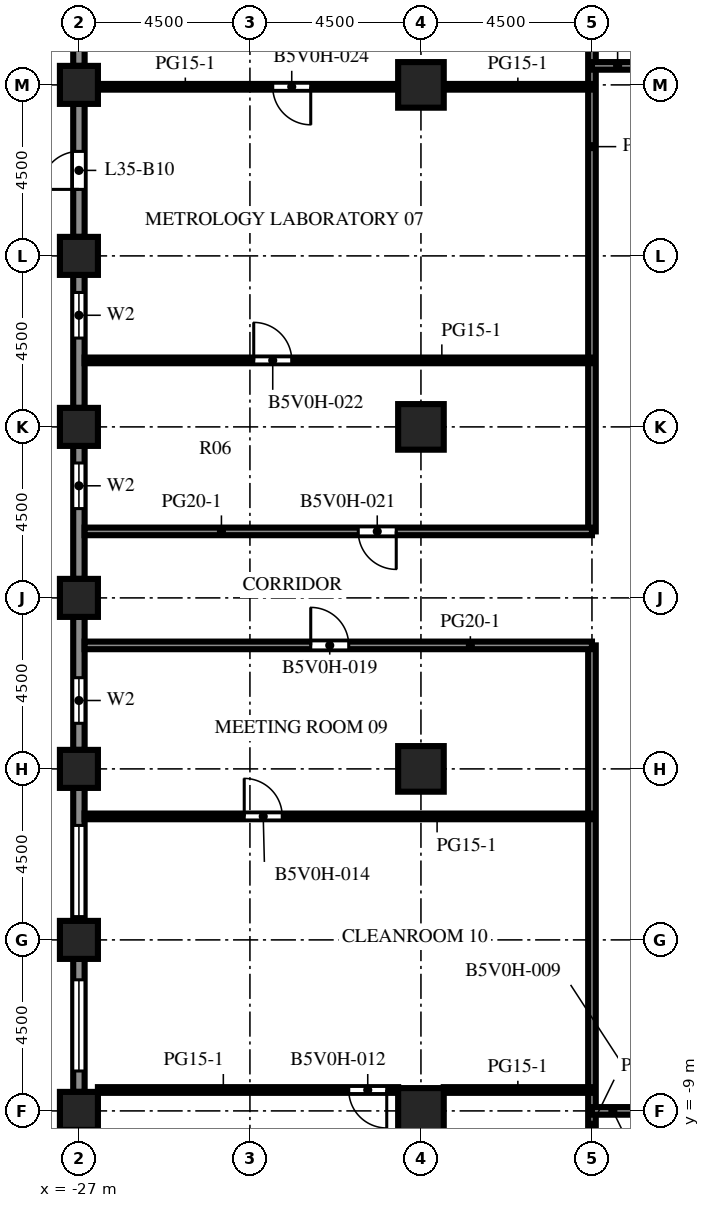
"""IFC4 building model, lengths in metres.
Left out: names, types, materials, properties, quantities, classifications, styles, units other than length and angle.
Written with IfcOpenShell. Run it as: python <this file> out.ifc"""

import sys

from ifc_helpers import new_model, si_unit, direction, frame, frame_2d, origin, origin_2d, place, context, subcontext, project, spatial, rectangle, extrude, element, fill, save


model = new_model("IFC4")
c1 = context("Model", 3, precision=1e-05, world=origin(), true_north=direction((0.0, 1.0)))
c2 = subcontext(c1, "Body", "Model", "MODEL_VIEW")
j1 = project(units=[si_unit("LENGTHUNIT", "METRE"), si_unit("PLANEANGLEUNIT", "RADIAN")], contexts=[c1])
p1 = place(None, origin())
s1 = spatial("IfcSite", under=j1, at=p1, CompositionType="ELEMENT")
p2 = place(p1, origin())
s2 = spatial("IfcBuilding", under=s1, at=p2, CompositionType="ELEMENT")
p3 = place(p2, frame((0.0, 0.0, 156.8)))
s3 = spatial("IfcBuildingStorey", under=s2, at=p3, CompositionType="ELEMENT", Elevation=156.8)
for number, where, z_axis, x_axis in (
    (1, (-27.0, -9.0, 0.0), (0.0, 0.0, 1.0), (1.0, 0.0, 0.0)),
    (2, (-27.0, -4.5, 0.0), (0.0, 0.0, 1.0), (1.0, 0.0, 0.0)),
    (3, (-27.0, 0.0, 0.0), (0.0, 0.0, 1.0), (1.0, 0.0, 0.0)),
    (4, (-27.0, 4.5, 0.0), (0.0, 0.0, 1.0), (1.0, 0.0, 0.0)),
    (5, (-27.0, 9.0, 0.0), (0.0, 0.0, 1.0), (1.0, 0.0, 0.0)),
    (6, (-27.0, 13.5, 0.0), (0.0, 0.0, 1.0), (1.0, 0.0, 0.0)),
    (7, (-27.0, 18.0, 0.0), (0.0, 0.0, 1.0), (1.0, 0.0, 0.0)),
):
    element("IfcColumn", number, at=place(p3, frame(where, z_axis=z_axis, x_axis=x_axis)), inside=s3, PredefinedType="COLUMN", context=c2, shape_type="SweptSolid", body=[
        extrude(rectangle(XDim=1.0, YDim=1.0, at=origin_2d()), origin(), (0.0, 0.0, 1.0), 4.1),
    ])
p4 = place(p3, frame((-18.0, -9.0, -0.45), z_axis=(0.0, 0.0, 1.0), x_axis=(1.0, 0.0, 0.0)))
e8 = element("IfcColumn", 8, at=p4, inside=s3, PredefinedType="COLUMN", context=c2, shape_type="SweptSolid", body=[
    extrude(rectangle(XDim=1.2, YDim=1.2, at=origin_2d()), origin(), (0.0, 0.0, 1.0), 4.55),
])
for number, where, z_axis, x_axis in (
    (9, (-18.0, 0.0, 0.0), (0.0, 0.0, 1.0), (1.0, 0.0, 0.0)),
    (10, (-18.0, 9.0, 0.0), (0.0, 0.0, 1.0), (1.0, 0.0, 0.0)),
    (11, (-18.0, 18.0, 0.0), (0.0, 0.0, 1.0), (1.0, 0.0, 0.0)),
):
    element("IfcColumn", number, at=place(p3, frame(where, z_axis=z_axis, x_axis=x_axis)), inside=s3, PredefinedType="COLUMN", context=c2, shape_type="SweptSolid", body=[
        extrude(rectangle(XDim=1.2, YDim=1.2, at=origin_2d()), origin(), (0.0, 0.0, 1.0), 4.1),
    ])
p5 = place(p3, frame((-27.0, 18.5, 0.0), z_axis=(0.0, 0.0, 1.0), x_axis=(0.0, 1.0, 0.0)))
e12 = element("IfcWall", 12, at=p5, inside=s3, PredefinedType="SOLIDWALL", context=c2, shape_type="SweptSolid", body=[
    extrude(rectangle(XDim=3.5, YDim=0.3, at=frame_2d((1.75, 0.0))), origin(), (0.0, 0.0, 1.0), 2.85),
])
p6 = place(p5, frame((0.55, 0.0, 0.8)))
e13 = element("IfcOpeningElement", 13, at=p6, cuts=e12, PredefinedType="OPENING", context=c2, shape_type="SweptSolid", body=[
    extrude(rectangle(XDim=2.4, YDim=1.7, at=frame_2d((1.2, 0.85))), frame((0.0, 0.16, 0.0), z_axis=(0.0, -1.0, 0.0), x_axis=(1.0, 0.0, 0.0)), (0.0, 0.0, 1.0), 0.32),
])
p7 = place(p3, frame((-27.0, 14.0, 0.0), z_axis=(0.0, 0.0, 1.0), x_axis=(0.0, 1.0, 0.0)))
e14 = element("IfcWall", 14, at=p7, inside=s3, PredefinedType="SOLIDWALL", context=c2, shape_type="SweptSolid", body=[
    extrude(rectangle(XDim=3.5, YDim=0.3, at=frame_2d((1.75, 0.0))), origin(), (0.0, 0.0, 1.0), 2.85),
])
p8 = place(p7, frame((1.25, 0.0, 0.0)))
e15 = element("IfcOpeningElement", 15, at=p8, cuts=e14, PredefinedType="OPENING", context=c2, shape_type="SweptSolid", body=[
    extrude(rectangle(XDim=1.0, YDim=2.2, at=frame_2d((0.5, 1.1))), frame((0.0, 0.16, 0.0), z_axis=(0.0, -1.0, 0.0), x_axis=(1.0, 0.0, 0.0)), (0.0, 0.0, 1.0), 0.32),
])
p9 = place(p3, frame((-27.0, 9.5, 0.0), z_axis=(0.0, 0.0, 1.0), x_axis=(0.0, 1.0, 0.0)))
e16 = element("IfcWall", 16, at=p9, inside=s3, PredefinedType="SOLIDWALL", context=c2, shape_type="SweptSolid", body=[
    extrude(rectangle(XDim=3.5, YDim=0.3, at=frame_2d((1.75, 0.0))), origin(), (0.0, 0.0, 1.0), 2.85),
])
p10 = place(p9, frame((1.837, 0.0, 0.8)))
e17 = element("IfcOpeningElement", 17, at=p10, cuts=e16, PredefinedType="OPENING", context=c2, shape_type="SweptSolid", body=[
    extrude(rectangle(XDim=1.2, YDim=1.7, at=frame_2d((0.6, 0.85))), frame((0.0, 0.16, 0.0), z_axis=(0.0, -1.0, 0.0), x_axis=(1.0, 0.0, 0.0)), (0.0, 0.0, 1.0), 0.32),
])
p11 = place(p3, frame((-27.0, 5.0, 0.0), z_axis=(0.0, 0.0, 1.0), x_axis=(0.0, 1.0, 0.0)))
e18 = element("IfcWall", 18, at=p11, inside=s3, PredefinedType="SOLIDWALL", context=c2, shape_type="SweptSolid", body=[
    extrude(rectangle(XDim=3.5, YDim=0.3, at=frame_2d((1.75, 0.0))), origin(), (0.0, 0.0, 1.0), 2.85),
])
p12 = place(p11, frame((1.85, 0.0, 0.8)))
e19 = element("IfcOpeningElement", 19, at=p12, cuts=e18, PredefinedType="OPENING", context=c2, shape_type="SweptSolid", body=[
    extrude(rectangle(XDim=1.2, YDim=1.7, at=frame_2d((0.6, 0.85))), frame((0.0, 0.16, 0.0), z_axis=(0.0, -1.0, 0.0), x_axis=(1.0, 0.0, 0.0)), (0.0, 0.0, 1.0), 0.32),
])
p13 = place(p3, frame((-27.0, 0.5, 0.0), z_axis=(0.0, 0.0, 1.0), x_axis=(0.0, 1.0, 0.0)))
e20 = element("IfcWall", 20, at=p13, inside=s3, PredefinedType="SOLIDWALL", context=c2, shape_type="SweptSolid", body=[
    extrude(rectangle(XDim=3.5, YDim=0.3, at=frame_2d((1.75, 0.0))), origin(), (0.0, 0.0, 1.0), 2.85),
])
p14 = place(p13, frame((0.7, 0.0, 0.8)))
e21 = element("IfcOpeningElement", 21, at=p14, cuts=e20, PredefinedType="OPENING", context=c2, shape_type="SweptSolid", body=[
    extrude(rectangle(XDim=1.2, YDim=1.7, at=frame_2d((0.6, 0.85))), frame((0.0, 0.16, 0.0), z_axis=(0.0, -1.0, 0.0), x_axis=(1.0, 0.0, 0.0)), (0.0, 0.0, 1.0), 0.32),
])
p15 = place(p3, frame((-27.0, -4.0, 0.0), z_axis=(0.0, 0.0, 1.0), x_axis=(0.0, 1.0, 0.0)))
e22 = element("IfcWall", 22, at=p15, inside=s3, PredefinedType="SOLIDWALL", context=c2, shape_type="SweptSolid", body=[
    extrude(rectangle(XDim=3.5, YDim=0.3, at=frame_2d((1.75, 0.0))), origin(), (0.0, 0.0, 1.0), 2.85),
])
p16 = place(p15, frame((0.113, 0.0, 0.8)))
e23 = element("IfcOpeningElement", 23, at=p16, cuts=e22, PredefinedType="OPENING", context=c2, shape_type="SweptSolid", body=[
    extrude(rectangle(XDim=2.4, YDim=1.7, at=frame_2d((1.2, 0.85))), frame((0.0, 0.16, 0.0), z_axis=(0.0, -1.0, 0.0), x_axis=(1.0, 0.0, 0.0)), (0.0, 0.0, 1.0), 0.32),
])
p17 = place(p3, frame((-27.0, -8.5, 0.0), z_axis=(0.0, 0.0, 1.0), x_axis=(0.0, 1.0, 0.0)))
e24 = element("IfcWall", 24, at=p17, inside=s3, PredefinedType="SOLIDWALL", context=c2, shape_type="SweptSolid", body=[
    extrude(rectangle(XDim=3.5, YDim=0.3, at=frame_2d((1.75, 0.0))), origin(), (0.0, 0.0, 1.0), 2.85),
])
p18 = place(p17, frame((0.55, 0.0, 0.8)))
e25 = element("IfcOpeningElement", 25, at=p18, cuts=e24, PredefinedType="OPENING", context=c2, shape_type="SweptSolid", body=[
    extrude(rectangle(XDim=2.4, YDim=1.7, at=frame_2d((1.2, 0.85))), frame((0.0, 0.16, 0.0), z_axis=(0.0, -1.0, 0.0), x_axis=(1.0, 0.0, 0.0)), (0.0, 0.0, 1.0), 0.32),
])
p19 = place(p3, frame((-13.5, -22.0, 0.0), z_axis=(0.0, 0.0, 1.0), x_axis=(0.0, 1.0, 0.0)))
e26 = element("IfcWall", 26, at=p19, inside=s3, PredefinedType="PARTITIONING", context=c2, shape_type="SweptSolid", body=[
    extrude(rectangle(XDim=25.25, YDim=0.2, at=frame_2d((12.625, 0.0))), origin(), (0.0, 0.0, 1.0), 3.65),
])
p20 = place(p3, frame((-13.5, 6.25, 0.0), z_axis=(0.0, 0.0, 1.0), x_axis=(0.0, 1.0, 0.0)))
e27 = element("IfcWall", 27, at=p20, inside=s3, PredefinedType="PARTITIONING", context=c2, shape_type="SweptSolid", body=[
    extrude(rectangle(XDim=20.25, YDim=0.2, at=frame_2d((10.125, 0.0))), origin(), (0.0, 0.0, 1.0), 3.65),
])
p21 = place(p3, frame((-10.5, -9.0, 0.0), z_axis=(0.0, 0.0, 1.0), x_axis=(-1.0, 0.0, 0.0)))
e28 = element("IfcWall", 28, at=p21, inside=s3, PredefinedType="PARTITIONING", context=c2, shape_type="SweptSolid", body=[
    extrude(rectangle(XDim=3.0, YDim=0.2, at=frame_2d((1.5, 0.0))), origin(), (0.0, 0.0, 1.0), 3.65),
])
p22 = place(p21, frame((0.9, 0.0, 0.0)))
e29 = element("IfcOpeningElement", 29, at=p22, cuts=e28, PredefinedType="OPENING", context=c2, shape_type="SweptSolid", body=[
    extrude(rectangle(XDim=1.0, YDim=2.1, at=frame_2d((0.5, 1.05))), frame((0.0, 0.11, 0.0), z_axis=(0.0, -1.0, 0.0), x_axis=(1.0, 0.0, 0.0)), (0.0, 0.0, 1.0), 0.22),
])
p23 = place(p3, frame((-18.6, -8.45, 0.0), z_axis=(0.0, 0.0, 1.0), x_axis=(-1.0, 0.0, 0.0)))
e30 = element("IfcWall", 30, at=p23, inside=s3, PredefinedType="PARTITIONING", context=c2, shape_type="SweptSolid", body=[
    extrude(rectangle(XDim=7.9, YDim=0.15, at=frame_2d((3.95, 0.0))), origin(), (0.0, 0.0, 1.0), 3.65),
])
p24 = place(p23, frame((0.3, 0.0, 0.0)))
e31 = element("IfcOpeningElement", 31, at=p24, cuts=e30, PredefinedType="OPENING", context=c2, shape_type="SweptSolid", body=[
    extrude(rectangle(XDim=1.0, YDim=2.1, at=frame_2d((0.5, 1.05))), frame((0.0, 0.085, 0.0), z_axis=(0.0, -1.0, 0.0), x_axis=(1.0, 0.0, 0.0)), (0.0, 0.0, 1.0), 0.17),
])
p25 = place(p3, frame((-17.4, -8.45, 0.0), z_axis=(0.0, 0.0, 1.0), x_axis=(1.0, 0.0, 0.0)))
e32 = element("IfcWall", 32, at=p25, inside=s3, PredefinedType="PARTITIONING", context=c2, shape_type="SweptSolid", body=[
    extrude(rectangle(XDim=3.9, YDim=0.15, at=frame_2d((1.95, 0.0))), origin(), (0.0, 0.0, 1.0), 3.65),
])
p26 = place(p3, frame((-13.5, -1.25, 0.0), z_axis=(0.0, 0.0, 1.0), x_axis=(-1.0, 0.0, 0.0)))
e33 = element("IfcWall", 33, at=p26, inside=s3, PredefinedType="PARTITIONING", context=c2, shape_type="SweptSolid", body=[
    extrude(rectangle(XDim=13.35, YDim=0.15, at=frame_2d((6.675, 0.0))), origin(), (0.0, 0.0, 1.0), 3.65),
])
p27 = place(p26, frame((8.15, 0.0, 0.0)))
e34 = element("IfcOpeningElement", 34, at=p27, cuts=e33, PredefinedType="OPENING", context=c2, shape_type="SweptSolid", body=[
    extrude(rectangle(XDim=1.0, YDim=2.1, at=frame_2d((0.5, 1.05))), frame((0.0, 0.085, 0.0), z_axis=(0.0, -1.0, 0.0), x_axis=(1.0, 0.0, 0.0)), (0.0, 0.0, 1.0), 0.17),
])
p28 = place(p3, frame((-13.5, 3.25, 0.0), z_axis=(0.0, 0.0, 1.0), x_axis=(-1.0, 0.0, 0.0)))
e35 = element("IfcWall", 35, at=p28, inside=s3, PredefinedType="PARTITIONING", context=c2, shape_type="SweptSolid", body=[
    extrude(rectangle(XDim=13.35, YDim=0.2, at=frame_2d((6.675, 0.0))), origin(), (0.0, 0.0, 1.0), 3.65),
])
p29 = place(p28, frame((6.4, 0.0, 0.0)))
e36 = element("IfcOpeningElement", 36, at=p29, cuts=e35, PredefinedType="OPENING", context=c2, shape_type="SweptSolid", body=[
    extrude(rectangle(XDim=1.0, YDim=2.1, at=frame_2d((0.5, 1.05))), frame((0.0, 0.11, 0.0), z_axis=(0.0, -1.0, 0.0), x_axis=(1.0, 0.0, 0.0)), (0.0, 0.0, 1.0), 0.22),
])
p30 = place(p3, frame((-26.85, 6.25, 0.0), z_axis=(0.0, 0.0, 1.0), x_axis=(1.0, 0.0, 0.0)))
e37 = element("IfcWall", 37, at=p30, inside=s3, PredefinedType="PARTITIONING", context=c2, shape_type="SweptSolid", body=[
    extrude(rectangle(XDim=13.35, YDim=0.2, at=frame_2d((6.675, 0.0))), origin(), (0.0, 0.0, 1.0), 3.65),
])
p31 = place(p30, frame((7.2, 0.0, 0.0)))
e38 = element("IfcOpeningElement", 38, at=p31, cuts=e37, PredefinedType="OPENING", context=c2, shape_type="SweptSolid", body=[
    extrude(rectangle(XDim=1.0, YDim=2.1, at=frame_2d((0.5, 1.05))), frame((0.0, 0.11, 0.0), z_axis=(0.0, -1.0, 0.0), x_axis=(1.0, 0.0, 0.0)), (0.0, 0.0, 1.0), 0.22),
])
p32 = place(p3, frame((-26.85, 10.75, 0.0), z_axis=(0.0, 0.0, 1.0), x_axis=(1.0, 0.0, 0.0)))
e39 = element("IfcWall", 39, at=p32, inside=s3, PredefinedType="PARTITIONING", context=c2, shape_type="SweptSolid", body=[
    extrude(rectangle(XDim=13.35, YDim=0.15, at=frame_2d((6.675, 0.0))), origin(), (0.0, 0.0, 1.0), 3.65),
])
p33 = place(p32, frame((4.45, 0.0, 0.0)))
e40 = element("IfcOpeningElement", 40, at=p33, cuts=e39, PredefinedType="OPENING", context=c2, shape_type="SweptSolid", body=[
    extrude(rectangle(XDim=1.0, YDim=2.1, at=frame_2d((0.5, 1.05))), frame((0.0, 0.085, 0.0), z_axis=(0.0, -1.0, 0.0), x_axis=(1.0, 0.0, 0.0)), (0.0, 0.0, 1.0), 0.17),
])
p34 = place(p3, frame((-26.5, 17.95, 0.0), z_axis=(0.0, 0.0, 1.0), x_axis=(1.0, 0.0, 0.0)))
e41 = element("IfcWall", 41, at=p34, inside=s3, PredefinedType="PARTITIONING", context=c2, shape_type="SweptSolid", body=[
    extrude(rectangle(XDim=7.9, YDim=0.15, at=frame_2d((3.95, 0.0))), origin(), (0.0, 0.0, 1.0), 3.65),
])
p35 = place(p34, frame((4.6, 0.0, 0.0)))
e42 = element("IfcOpeningElement", 42, at=p35, cuts=e41, PredefinedType="OPENING", context=c2, shape_type="SweptSolid", body=[
    extrude(rectangle(XDim=1.0, YDim=2.1, at=frame_2d((0.5, 1.05))), frame((0.0, 0.085, 0.0), z_axis=(0.0, -1.0, 0.0), x_axis=(1.0, 0.0, 0.0)), (0.0, 0.0, 1.0), 0.17),
])
p36 = place(p3, frame((-17.4, 17.95, 0.0), z_axis=(0.0, 0.0, 1.0), x_axis=(1.0, 0.0, 0.0)))
e43 = element("IfcWall", 43, at=p36, inside=s3, PredefinedType="PARTITIONING", context=c2, shape_type="SweptSolid", body=[
    extrude(rectangle(XDim=3.9, YDim=0.15, at=frame_2d((1.95, 0.0))), origin(), (0.0, 0.0, 1.0), 3.65),
])
p37 = place(p3, frame((-13.5, 18.5, 0.0), z_axis=(0.0, 0.0, 1.0), x_axis=(1.0, 0.0, 0.0)))
e44 = element("IfcWall", 44, at=p37, inside=s3, PredefinedType="PARTITIONING", context=c2, shape_type="SweptSolid", body=[
    extrude(rectangle(XDim=3.0, YDim=0.2, at=frame_2d((1.5, 0.0))), origin(), (0.0, 0.0, 1.0), 3.65),
])
p38 = place(p37, frame((1.35, 0.0, 0.0)))
e45 = element("IfcOpeningElement", 45, at=p38, cuts=e44, PredefinedType="OPENING", context=c2, shape_type="SweptSolid", body=[
    extrude(rectangle(XDim=1.0, YDim=2.1, at=frame_2d((0.5, 1.05))), frame((0.0, 0.11, 0.0), z_axis=(0.0, -1.0, 0.0), x_axis=(1.0, 0.0, 0.0)), (0.0, 0.0, 1.0), 0.22),
])
p39 = place(p8, origin())
e46 = element("IfcDoor", 46, at=p39, inside=s3, OperationType="SINGLE_SWING_LEFT", PredefinedType="DOOR", context=c2, shape_type="SweptSolid", body=[
    extrude(rectangle(XDim=1.0, YDim=2.2, at=frame_2d((0.5, 1.1))), frame((0.0, 0.025, 0.0), z_axis=(0.0, -1.0, 0.0), x_axis=(1.0, 0.0, 0.0)), (0.0, 0.0, 1.0), 0.05),
])
fill(e15, e46)
p40 = place(p10, origin())
e47 = element("IfcWindow", 47, at=p40, inside=s3, PartitioningType="SINGLE_PANEL", PredefinedType="WINDOW", context=c2, shape_type="SweptSolid", body=[
    extrude(rectangle(XDim=1.2, YDim=1.7, at=frame_2d((0.6, 0.85))), frame((0.0, 0.03, 0.0), z_axis=(0.0, -1.0, 0.0), x_axis=(1.0, 0.0, 0.0)), (0.0, 0.0, 1.0), 0.06),
])
fill(e17, e47)
p41 = place(p12, origin())
e48 = element("IfcWindow", 48, at=p41, inside=s3, PartitioningType="SINGLE_PANEL", PredefinedType="WINDOW", context=c2, shape_type="SweptSolid", body=[
    extrude(rectangle(XDim=1.2, YDim=1.7, at=frame_2d((0.6, 0.85))), frame((0.0, 0.03, 0.0), z_axis=(0.0, -1.0, 0.0), x_axis=(1.0, 0.0, 0.0)), (0.0, 0.0, 1.0), 0.06),
])
fill(e19, e48)
p42 = place(p14, origin())
e49 = element("IfcWindow", 49, at=p42, inside=s3, PartitioningType="SINGLE_PANEL", PredefinedType="WINDOW", context=c2, shape_type="SweptSolid", body=[
    extrude(rectangle(XDim=1.2, YDim=1.7, at=frame_2d((0.6, 0.85))), frame((0.0, 0.03, 0.0), z_axis=(0.0, -1.0, 0.0), x_axis=(1.0, 0.0, 0.0)), (0.0, 0.0, 1.0), 0.06),
])
fill(e21, e49)
p43 = place(p16, origin())
e50 = element("IfcWindow", 50, at=p43, inside=s3, PartitioningType="SINGLE_PANEL", PredefinedType="WINDOW", context=c2, shape_type="SweptSolid", body=[
    extrude(rectangle(XDim=2.4, YDim=1.7, at=frame_2d((1.2, 0.85))), frame((0.0, 0.03, 0.0), z_axis=(0.0, -1.0, 0.0), x_axis=(1.0, 0.0, 0.0)), (0.0, 0.0, 1.0), 0.06),
])
fill(e23, e50)
p44 = place(p18, origin())
e51 = element("IfcWindow", 51, at=p44, inside=s3, PartitioningType="SINGLE_PANEL", PredefinedType="WINDOW", context=c2, shape_type="SweptSolid", body=[
    extrude(rectangle(XDim=2.4, YDim=1.7, at=frame_2d((1.2, 0.85))), frame((0.0, 0.03, 0.0), z_axis=(0.0, -1.0, 0.0), x_axis=(1.0, 0.0, 0.0)), (0.0, 0.0, 1.0), 0.06),
])
fill(e25, e51)
p45 = place(p24, origin())
e52 = element("IfcDoor", 52, at=p45, inside=s3, OperationType="SINGLE_SWING_LEFT", PredefinedType="DOOR", context=c2, shape_type="SweptSolid", body=[
    extrude(rectangle(XDim=1.0, YDim=2.1, at=frame_2d((0.5, 1.05))), frame((0.0, 0.025, 0.0), z_axis=(0.0, -1.0, 0.0), x_axis=(1.0, 0.0, 0.0)), (0.0, 0.0, 1.0), 0.05),
])
fill(e31, e52)
p46 = place(p27, origin())
e53 = element("IfcDoor", 53, at=p46, inside=s3, OperationType="SINGLE_SWING_RIGHT", PredefinedType="DOOR", context=c2, shape_type="SweptSolid", body=[
    extrude(rectangle(XDim=1.0, YDim=2.1, at=frame_2d((0.5, 1.05))), frame((0.0, 0.025, 0.0), z_axis=(0.0, -1.0, 0.0), x_axis=(1.0, 0.0, 0.0)), (0.0, 0.0, 1.0), 0.05),
])
fill(e34, e53)
p47 = place(p29, origin())
e54 = element("IfcDoor", 54, at=p47, inside=s3, OperationType="SINGLE_SWING_RIGHT", PredefinedType="DOOR", context=c2, shape_type="SweptSolid", body=[
    extrude(rectangle(XDim=1.0, YDim=2.1, at=frame_2d((0.5, 1.05))), frame((0.0, 0.025, 0.0), z_axis=(0.0, -1.0, 0.0), x_axis=(1.0, 0.0, 0.0)), (0.0, 0.0, 1.0), 0.05),
])
fill(e36, e54)
p48 = place(p31, origin())
e55 = element("IfcDoor", 55, at=p48, inside=s3, OperationType="SINGLE_SWING_RIGHT", PredefinedType="DOOR", context=c2, shape_type="SweptSolid", body=[
    extrude(rectangle(XDim=1.0, YDim=2.1, at=frame_2d((0.5, 1.05))), frame((0.0, 0.025, 0.0), z_axis=(0.0, -1.0, 0.0), x_axis=(1.0, 0.0, 0.0)), (0.0, 0.0, 1.0), 0.05),
])
fill(e38, e55)
p49 = place(p33, origin())
e56 = element("IfcDoor", 56, at=p49, inside=s3, OperationType="SINGLE_SWING_LEFT", PredefinedType="DOOR", context=c2, shape_type="SweptSolid", body=[
    extrude(rectangle(XDim=1.0, YDim=2.1, at=frame_2d((0.5, 1.05))), frame((0.0, 0.025, 0.0), z_axis=(0.0, -1.0, 0.0), x_axis=(1.0, 0.0, 0.0)), (0.0, 0.0, 1.0), 0.05),
])
fill(e40, e56)
p50 = place(p35, origin())
e57 = element("IfcDoor", 57, at=p50, inside=s3, OperationType="SINGLE_SWING_RIGHT", PredefinedType="DOOR", context=c2, shape_type="SweptSolid", body=[
    extrude(rectangle(XDim=1.0, YDim=2.1, at=frame_2d((0.5, 1.05))), frame((0.0, 0.025, 0.0), z_axis=(0.0, -1.0, 0.0), x_axis=(1.0, 0.0, 0.0)), (0.0, 0.0, 1.0), 0.05),
])
fill(e42, e57)
save(model, sys.argv[1])
